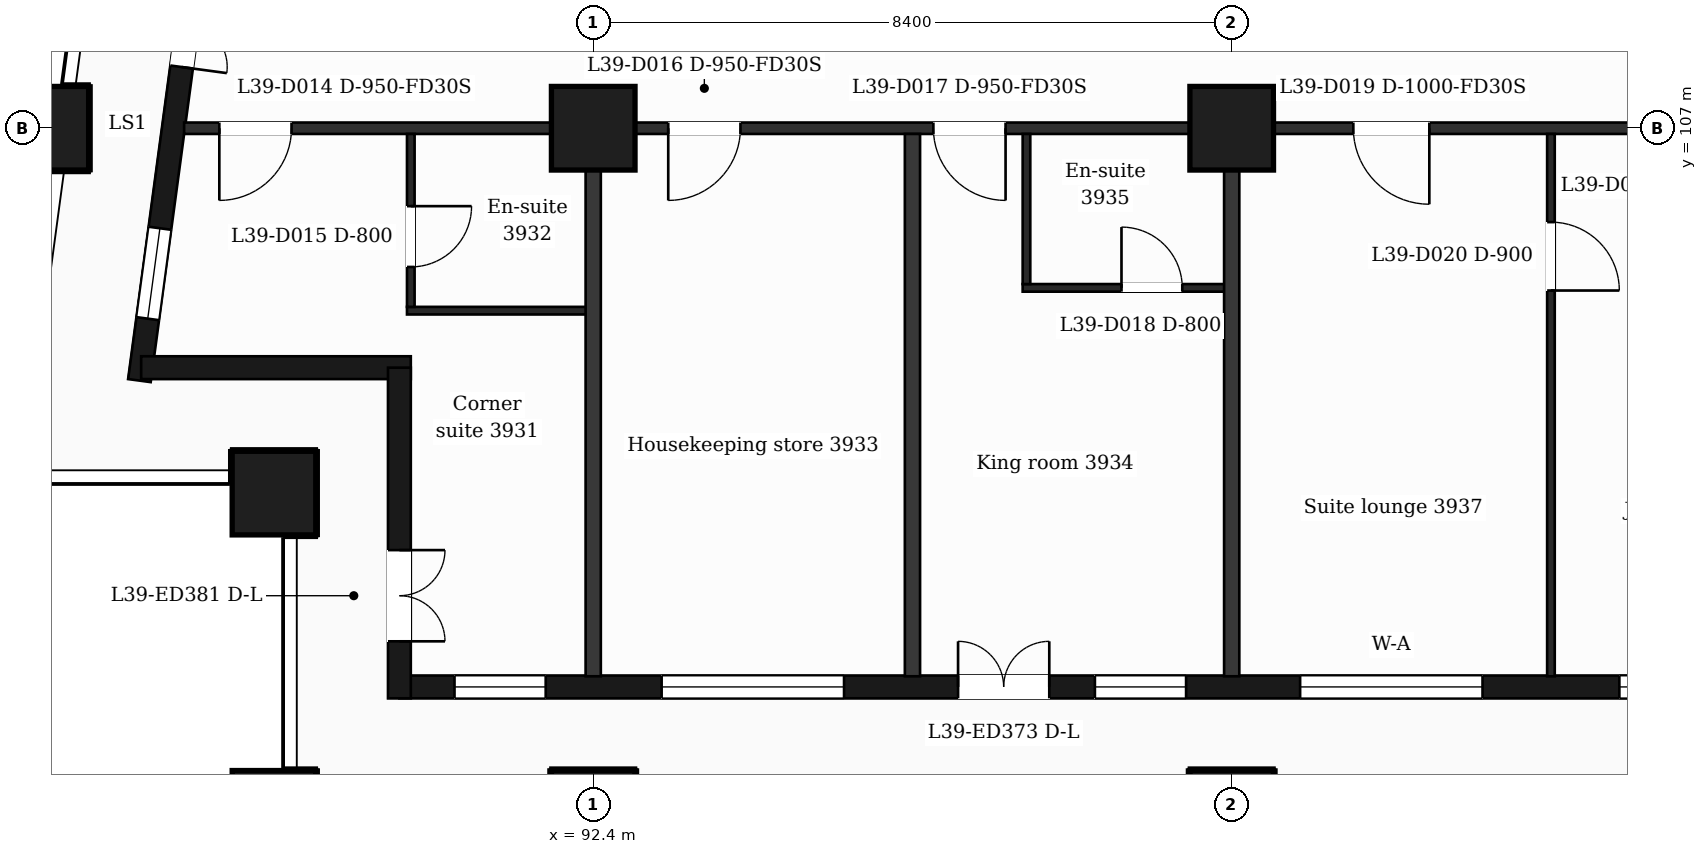
"""IFC4 building model, lengths in metres.
Left out: names, types, materials, properties, quantities, classifications, styles, units other than length and angle.
Written with IfcOpenShell. Run it as: python <this file> out.ifc"""

import sys

from ifc_helpers import new_model, si_unit, direction, frame, frame_2d, origin, origin_2d, place, context, subcontext, project, spatial, rectangle, extrude, element, fill, save


model = new_model("IFC4")
c1 = context("Model", 3, precision=1e-05, world=origin(), true_north=direction((0.0, 1.0)))
c2 = subcontext(c1, "Body", "Model", "MODEL_VIEW")
j1 = project(units=[si_unit("LENGTHUNIT", "METRE"), si_unit("PLANEANGLEUNIT", "RADIAN")], contexts=[c1])
p1 = place(None, origin())
s1 = spatial("IfcSite", under=j1, at=p1, CompositionType="ELEMENT")
p2 = place(p1, origin())
s2 = spatial("IfcBuilding", under=s1, at=p2, CompositionType="ELEMENT")
p3 = place(p2, frame((0.0, 0.0, 166.3)))
s3 = spatial("IfcBuildingStorey", under=s2, at=p3, CompositionType="ELEMENT", Elevation=166.3)
for number, where, z_axis, x_axis in (
    (1, (92.4, 98.0, 0.0), (0.0, 0.0, 1.0), (1.0, 0.0, 0.0)),
    (2, (100.8, 98.0, 0.0), (0.0, 0.0, 1.0), (1.0, 0.0, 0.0)),
    (3, (88.2, 98.0, 0.0), (0.0, 0.0, 1.0), (1.0, 0.0, 0.0)),
    (4, (88.2, 102.2, 0.0), (0.0, 0.0, 1.0), (1.0, 0.0, 0.0)),
    (5, (92.4, 107.0, 0.0), (0.0, 0.0, 1.0), (1.0, 0.0, 0.0)),
    (6, (100.8, 107.0, 0.0), (0.0, 0.0, 1.0), (1.0, 0.0, 0.0)),
    (7, (85.211, 107.0, 0.0), (0.0, 0.0, 1.0), (1.0, 0.0, 0.0)),
):
    element("IfcColumn", number, at=place(p3, frame(where, z_axis=z_axis, x_axis=x_axis)), inside=s3, PredefinedType="COLUMN", context=c2, shape_type="SweptSolid", body=[
        extrude(rectangle(XDim=1.1, YDim=1.1, at=origin_2d()), origin(), (0.0, 0.0, 1.0), 3.7),
    ])
p4 = place(p3, frame((89.85, 99.65, 0.0), z_axis=(0.0, 0.0, 1.0), x_axis=(1.0, 0.0, 0.0)))
e8 = element("IfcWall", 8, at=p4, inside=s3, PredefinedType="SOLIDWALL", context=c2, shape_type="SweptSolid", body=[
    extrude(rectangle(XDim=47.25, YDim=0.3, at=frame_2d((23.625, 0.0))), origin(), (0.0, 0.0, 1.0), 3.38),
])
p5 = place(p4, frame((0.725, 0.0, 0.9)))
e9 = element("IfcOpeningElement", 9, at=p5, cuts=e8, PredefinedType="OPENING", context=c2, shape_type="SweptSolid", body=[
    extrude(rectangle(XDim=1.2, YDim=2.1, at=frame_2d((0.6, 1.05))), frame((0.0, 0.16, 0.0), z_axis=(0.0, -1.0, 0.0), x_axis=(1.0, 0.0, 0.0)), (0.0, 0.0, 1.0), 0.32),
])
p6 = place(p4, frame((3.45, 0.0, 0.9)))
e10 = element("IfcOpeningElement", 10, at=p6, cuts=e8, PredefinedType="OPENING", context=c2, shape_type="SweptSolid", body=[
    extrude(rectangle(XDim=2.4, YDim=2.1, at=frame_2d((1.2, 1.05))), frame((0.0, 0.16, 0.0), z_axis=(0.0, -1.0, 0.0), x_axis=(1.0, 0.0, 0.0)), (0.0, 0.0, 1.0), 0.32),
])
p7 = place(p4, frame((7.35, 0.0, 0.0)))
e11 = element("IfcOpeningElement", 11, at=p7, cuts=e8, PredefinedType="OPENING", context=c2, shape_type="SweptSolid", body=[
    extrude(rectangle(XDim=1.2, YDim=2.4, at=frame_2d((0.6, 1.2))), frame((0.0, 0.16, 0.0), z_axis=(0.0, -1.0, 0.0), x_axis=(1.0, 0.0, 0.0)), (0.0, 0.0, 1.0), 0.32),
])
p8 = place(p4, frame((9.15, 0.0, 0.9)))
e12 = element("IfcOpeningElement", 12, at=p8, cuts=e8, PredefinedType="OPENING", context=c2, shape_type="SweptSolid", body=[
    extrude(rectangle(XDim=1.2, YDim=2.1, at=frame_2d((0.6, 1.05))), frame((0.0, 0.16, 0.0), z_axis=(0.0, -1.0, 0.0), x_axis=(1.0, 0.0, 0.0)), (0.0, 0.0, 1.0), 0.32),
])
p9 = place(p4, frame((11.85, 0.0, 0.9)))
e13 = element("IfcOpeningElement", 13, at=p9, cuts=e8, PredefinedType="OPENING", context=c2, shape_type="SweptSolid", body=[
    extrude(rectangle(XDim=2.4, YDim=2.1, at=frame_2d((1.2, 1.05))), frame((0.0, 0.16, 0.0), z_axis=(0.0, -1.0, 0.0), x_axis=(1.0, 0.0, 0.0)), (0.0, 0.0, 1.0), 0.32),
])
p10 = place(p4, frame((16.05, 0.0, 0.9)))
e14 = element("IfcOpeningElement", 14, at=p10, cuts=e8, PredefinedType="OPENING", context=c2, shape_type="SweptSolid", body=[
    extrude(rectangle(XDim=2.4, YDim=2.1, at=frame_2d((1.2, 1.05))), frame((0.0, 0.16, 0.0), z_axis=(0.0, -1.0, 0.0), x_axis=(1.0, 0.0, 0.0)), (0.0, 0.0, 1.0), 0.32),
])
p11 = place(p4, frame((20.85, 0.0, 0.9)))
e15 = element("IfcOpeningElement", 15, at=p11, cuts=e8, PredefinedType="OPENING", context=c2, shape_type="SweptSolid", body=[
    extrude(rectangle(XDim=1.2, YDim=2.1, at=frame_2d((0.6, 1.05))), frame((0.0, 0.16, 0.0), z_axis=(0.0, -1.0, 0.0), x_axis=(1.0, 0.0, 0.0)), (0.0, 0.0, 1.0), 0.32),
])
p12 = place(p4, frame((25.05, 0.0, 0.9)))
e16 = element("IfcOpeningElement", 16, at=p12, cuts=e8, PredefinedType="OPENING", context=c2, shape_type="SweptSolid", body=[
    extrude(rectangle(XDim=1.2, YDim=2.1, at=frame_2d((0.6, 1.05))), frame((0.0, 0.16, 0.0), z_axis=(0.0, -1.0, 0.0), x_axis=(1.0, 0.0, 0.0)), (0.0, 0.0, 1.0), 0.32),
])
p13 = place(p4, frame((28.65, 0.0, 0.9)))
e17 = element("IfcOpeningElement", 17, at=p13, cuts=e8, PredefinedType="OPENING", context=c2, shape_type="SweptSolid", body=[
    extrude(rectangle(XDim=2.4, YDim=2.1, at=frame_2d((1.2, 1.05))), frame((0.0, 0.16, 0.0), z_axis=(0.0, -1.0, 0.0), x_axis=(1.0, 0.0, 0.0)), (0.0, 0.0, 1.0), 0.32),
])
p14 = place(p4, frame((32.85, 0.0, 0.9)))
e18 = element("IfcOpeningElement", 18, at=p14, cuts=e8, PredefinedType="OPENING", context=c2, shape_type="SweptSolid", body=[
    extrude(rectangle(XDim=2.4, YDim=2.1, at=frame_2d((1.2, 1.05))), frame((0.0, 0.16, 0.0), z_axis=(0.0, -1.0, 0.0), x_axis=(1.0, 0.0, 0.0)), (0.0, 0.0, 1.0), 0.32),
])
p15 = place(p4, frame((37.05, 0.0, 0.9)))
e19 = element("IfcOpeningElement", 19, at=p15, cuts=e8, PredefinedType="OPENING", context=c2, shape_type="SweptSolid", body=[
    extrude(rectangle(XDim=2.4, YDim=2.1, at=frame_2d((1.2, 1.05))), frame((0.0, 0.16, 0.0), z_axis=(0.0, -1.0, 0.0), x_axis=(1.0, 0.0, 0.0)), (0.0, 0.0, 1.0), 0.32),
])
p16 = place(p4, frame((41.25, 0.0, 0.9)))
e20 = element("IfcOpeningElement", 20, at=p16, cuts=e8, PredefinedType="OPENING", context=c2, shape_type="SweptSolid", body=[
    extrude(rectangle(XDim=2.4, YDim=2.1, at=frame_2d((1.2, 1.05))), frame((0.0, 0.16, 0.0), z_axis=(0.0, -1.0, 0.0), x_axis=(1.0, 0.0, 0.0)), (0.0, 0.0, 1.0), 0.32),
])
p17 = place(p4, frame((45.25, 0.0, 0.9)))
e21 = element("IfcOpeningElement", 21, at=p17, cuts=e8, PredefinedType="OPENING", context=c2, shape_type="SweptSolid", body=[
    extrude(rectangle(XDim=1.2, YDim=2.1, at=frame_2d((0.6, 1.05))), frame((0.0, 0.16, 0.0), z_axis=(0.0, -1.0, 0.0), x_axis=(1.0, 0.0, 0.0)), (0.0, 0.0, 1.0), 0.32),
])
p18 = place(p3, frame((87.334, 110.4, 0.0), z_axis=(0.0, 0.0, 1.0), x_axis=(-0.133437175554, -0.991057273915, 0.0)))
e22 = element("IfcWall", 22, at=p18, inside=s3, PredefinedType="SOLIDWALL", context=c2, shape_type="SweptSolid", body=[
    extrude(rectangle(XDim=6.781, YDim=0.3, at=frame_2d((3.39, 0.0))), origin(), (0.0, 0.0, 1.0), 3.38),
])
p19 = place(p18, frame((1.418, 0.0, 0.0)))
e23 = element("IfcOpeningElement", 23, at=p19, cuts=e22, PredefinedType="OPENING", context=c2, shape_type="SweptSolid", body=[
    extrude(rectangle(XDim=1.2, YDim=2.4, at=frame_2d((0.6, 1.2))), frame((0.0, 0.16, 0.0), z_axis=(0.0, -1.0, 0.0), x_axis=(1.0, 0.0, 0.0)), (0.0, 0.0, 1.0), 0.32),
])
p20 = place(p18, frame((4.758, 0.0, 0.9)))
e24 = element("IfcOpeningElement", 24, at=p20, cuts=e22, PredefinedType="OPENING", context=c2, shape_type="SweptSolid", body=[
    extrude(rectangle(XDim=1.2, YDim=2.1, at=frame_2d((0.6, 1.05))), frame((0.0, 0.16, 0.0), z_axis=(0.0, -1.0, 0.0), x_axis=(1.0, 0.0, 0.0)), (0.0, 0.0, 1.0), 0.32),
])
p21 = place(p3, frame((86.452, 103.85, 0.0), z_axis=(0.0, 0.0, 1.0), x_axis=(1.0, 0.0, 0.0)))
e25 = element("IfcWall", 25, at=p21, inside=s3, PredefinedType="SOLIDWALL", context=c2, shape_type="SweptSolid", body=[
    extrude(rectangle(XDim=3.548, YDim=0.3, at=frame_2d((1.774, 0.0))), origin(), (0.0, 0.0, 1.0), 3.38),
])
p22 = place(p3, frame((89.85, 103.85, 0.0), z_axis=(0.0, 0.0, 1.0), x_axis=(0.0, -1.0, 0.0)))
e26 = element("IfcWall", 26, at=p22, inside=s3, PredefinedType="SOLIDWALL", context=c2, shape_type="SweptSolid", body=[
    extrude(rectangle(XDim=4.35, YDim=0.3, at=frame_2d((2.175, 0.0))), origin(), (0.0, 0.0, 1.0), 3.38),
])
p23 = place(p22, frame((2.4, 0.0, 0.0)))
e27 = element("IfcOpeningElement", 27, at=p23, cuts=e26, PredefinedType="OPENING", context=c2, shape_type="SweptSolid", body=[
    extrude(rectangle(XDim=1.2, YDim=2.4, at=frame_2d((0.6, 1.2))), frame((0.0, 0.16, 0.0), z_axis=(0.0, -1.0, 0.0), x_axis=(1.0, 0.0, 0.0)), (0.0, 0.0, 1.0), 0.32),
])
p24 = place(p3, frame((89.95, 104.6, 0.0), z_axis=(0.0, 0.0, 1.0), x_axis=(1.0, 0.0, 0.0)))
e28 = element("IfcWall", 28, at=p24, inside=s3, PredefinedType="PARTITIONING", context=c2, shape_type="SweptSolid", body=[
    extrude(rectangle(XDim=2.45, YDim=0.1, at=frame_2d((1.225, 0.0))), origin(), (0.0, 0.0, 1.0), 3.38),
])
p25 = place(p3, frame((98.05, 104.9, 0.0), z_axis=(0.0, 0.0, 1.0), x_axis=(1.0, 0.0, 0.0)))
e29 = element("IfcWall", 29, at=p25, inside=s3, PredefinedType="PARTITIONING", context=c2, shape_type="SweptSolid", body=[
    extrude(rectangle(XDim=2.75, YDim=0.1, at=frame_2d((1.375, 0.0))), origin(), (0.0, 0.0, 1.0), 3.38),
])
p26 = place(p25, frame((1.3, 0.0, 0.0)))
e30 = element("IfcOpeningElement", 30, at=p26, cuts=e29, PredefinedType="OPENING", context=c2, shape_type="SweptSolid", body=[
    extrude(rectangle(XDim=0.8, YDim=2.1, at=frame_2d((0.4, 1.05))), frame((0.0, 0.06, 0.0), z_axis=(0.0, -1.0, 0.0), x_axis=(1.0, 0.0, 0.0)), (0.0, 0.0, 1.0), 0.12),
])
p27 = place(p3, frame((87.018, 107.0, 0.0), z_axis=(0.0, 0.0, 1.0), x_axis=(1.0, 0.0, 0.0)))
e31 = element("IfcWall", 31, at=p27, inside=s3, PredefinedType="PARTITIONING", context=c2, shape_type="SweptSolid", body=[
    extrude(rectangle(XDim=52.765, YDim=0.15, at=frame_2d((26.382, 0.0))), origin(), (0.0, 0.0, 1.0), 3.38),
])
p28 = place(p27, frame((0.463, 0.0, 0.0)))
e32 = element("IfcOpeningElement", 32, at=p28, cuts=e31, PredefinedType="OPENING", context=c2, shape_type="SweptSolid", body=[
    extrude(rectangle(XDim=0.95, YDim=2.1, at=frame_2d((0.475, 1.05))), frame((0.0, 0.085, 0.0), z_axis=(0.0, -1.0, 0.0), x_axis=(1.0, 0.0, 0.0)), (0.0, 0.0, 1.0), 0.17),
])
p29 = place(p27, frame((6.369, 0.0, 0.0)))
e33 = element("IfcOpeningElement", 33, at=p29, cuts=e31, PredefinedType="OPENING", context=c2, shape_type="SweptSolid", body=[
    extrude(rectangle(XDim=0.95, YDim=2.1, at=frame_2d((0.475, 1.05))), frame((0.0, 0.085, 0.0), z_axis=(0.0, -1.0, 0.0), x_axis=(1.0, 0.0, 0.0)), (0.0, 0.0, 1.0), 0.17),
])
p30 = place(p27, frame((9.857, 0.0, 0.0)))
e34 = element("IfcOpeningElement", 34, at=p30, cuts=e31, PredefinedType="OPENING", context=c2, shape_type="SweptSolid", body=[
    extrude(rectangle(XDim=0.95, YDim=2.1, at=frame_2d((0.475, 1.05))), frame((0.0, 0.085, 0.0), z_axis=(0.0, -1.0, 0.0), x_axis=(1.0, 0.0, 0.0)), (0.0, 0.0, 1.0), 0.17),
])
p31 = place(p27, frame((15.382, 0.0, 0.0)))
e35 = element("IfcOpeningElement", 35, at=p31, cuts=e31, PredefinedType="OPENING", context=c2, shape_type="SweptSolid", body=[
    extrude(rectangle(XDim=1.0, YDim=2.1, at=frame_2d((0.5, 1.05))), frame((0.0, 0.085, 0.0), z_axis=(0.0, -1.0, 0.0), x_axis=(1.0, 0.0, 0.0)), (0.0, 0.0, 1.0), 0.17),
])
p32 = place(p27, frame((24.932, 0.0, 0.0)))
e36 = element("IfcOpeningElement", 36, at=p32, cuts=e31, PredefinedType="OPENING", context=c2, shape_type="SweptSolid", body=[
    extrude(rectangle(XDim=1.0, YDim=2.1, at=frame_2d((0.5, 1.05))), frame((0.0, 0.085, 0.0), z_axis=(0.0, -1.0, 0.0), x_axis=(1.0, 0.0, 0.0)), (0.0, 0.0, 1.0), 0.17),
])
p33 = place(p27, frame((27.819, 0.0, 0.0)))
e37 = element("IfcOpeningElement", 37, at=p33, cuts=e31, PredefinedType="OPENING", context=c2, shape_type="SweptSolid", body=[
    extrude(rectangle(XDim=0.95, YDim=2.1, at=frame_2d((0.475, 1.05))), frame((0.0, 0.085, 0.0), z_axis=(0.0, -1.0, 0.0), x_axis=(1.0, 0.0, 0.0)), (0.0, 0.0, 1.0), 0.17),
])
p34 = place(p27, frame((42.012, 0.0, 0.0)))
e38 = element("IfcOpeningElement", 38, at=p34, cuts=e31, PredefinedType="OPENING", context=c2, shape_type="SweptSolid", body=[
    extrude(rectangle(XDim=1.0, YDim=2.1, at=frame_2d((0.5, 1.05))), frame((0.0, 0.085, 0.0), z_axis=(0.0, -1.0, 0.0), x_axis=(1.0, 0.0, 0.0)), (0.0, 0.0, 1.0), 0.17),
])
p35 = place(p27, frame((48.249, 0.0, 0.0)))
e39 = element("IfcOpeningElement", 39, at=p35, cuts=e31, PredefinedType="OPENING", context=c2, shape_type="SweptSolid", body=[
    extrude(rectangle(XDim=0.95, YDim=2.1, at=frame_2d((0.475, 1.05))), frame((0.0, 0.085, 0.0), z_axis=(0.0, -1.0, 0.0), x_axis=(1.0, 0.0, 0.0)), (0.0, 0.0, 1.0), 0.17),
])
p36 = place(p3, frame((90.0, 104.65, 0.0), z_axis=(0.0, 0.0, 1.0), x_axis=(0.0, 1.0, 0.0)))
e40 = element("IfcWall", 40, at=p36, inside=s3, PredefinedType="PARTITIONING", context=c2, shape_type="SweptSolid", body=[
    extrude(rectangle(XDim=2.275, YDim=0.1, at=frame_2d((1.138, 0.0))), origin(), (0.0, 0.0, 1.0), 3.38),
])
p37 = place(p36, frame((0.525, 0.0, 0.0)))
e41 = element("IfcOpeningElement", 41, at=p37, cuts=e40, PredefinedType="OPENING", context=c2, shape_type="SweptSolid", body=[
    extrude(rectangle(XDim=0.8, YDim=2.1, at=frame_2d((0.4, 1.05))), frame((0.0, 0.06, 0.0), z_axis=(0.0, -1.0, 0.0), x_axis=(1.0, 0.0, 0.0)), (0.0, 0.0, 1.0), 0.12),
])
for number, where, z_axis, x_axis in (
    (42, (92.4, 99.79, 0.0), (0.0, 0.0, 1.0), (0.0, 1.0, 0.0)),
    (43, (96.6, 99.79, 0.0), (0.0, 0.0, 1.0), (0.0, 1.0, 0.0)),
):
    element("IfcWall", number, at=place(p3, frame(where, z_axis=z_axis, x_axis=x_axis)), inside=s3, PredefinedType="PARTITIONING", context=c2, shape_type="SweptSolid", body=[
        extrude(rectangle(XDim=7.135, YDim=0.2, at=frame_2d((3.567, 0.0))), origin(), (0.0, 0.0, 1.0), 3.38),
    ])
p38 = place(p3, frame((98.1, 104.95, 0.0), z_axis=(0.0, 0.0, 1.0), x_axis=(0.0, 1.0, 0.0)))
e44 = element("IfcWall", 44, at=p38, inside=s3, PredefinedType="PARTITIONING", context=c2, shape_type="SweptSolid", body=[
    extrude(rectangle(XDim=1.975, YDim=0.1, at=frame_2d((0.988, 0.0))), origin(), (0.0, 0.0, 1.0), 3.38),
])
p39 = place(p3, frame((100.8, 99.79, 0.0), z_axis=(0.0, 0.0, 1.0), x_axis=(0.0, 1.0, 0.0)))
e45 = element("IfcWall", 45, at=p39, inside=s3, PredefinedType="PARTITIONING", context=c2, shape_type="SweptSolid", body=[
    extrude(rectangle(XDim=7.135, YDim=0.2, at=frame_2d((3.567, 0.0))), origin(), (0.0, 0.0, 1.0), 3.38),
])
p40 = place(p3, frame((105.0, 99.79, 0.0), z_axis=(0.0, 0.0, 1.0), x_axis=(0.0, 1.0, 0.0)))
e46 = element("IfcWall", 46, at=p40, inside=s3, PredefinedType="PARTITIONING", context=c2, shape_type="SweptSolid", body=[
    extrude(rectangle(XDim=7.135, YDim=0.1, at=frame_2d((3.567, 0.0))), origin(), (0.0, 0.0, 1.0), 3.38),
])
p41 = place(p40, frame((5.075, 0.0, 0.0)))
e47 = element("IfcOpeningElement", 47, at=p41, cuts=e46, PredefinedType="OPENING", context=c2, shape_type="SweptSolid", body=[
    extrude(rectangle(XDim=0.9, YDim=2.1, at=frame_2d((0.45, 1.05))), frame((0.0, 0.06, 0.0), z_axis=(0.0, -1.0, 0.0), x_axis=(1.0, 0.0, 0.0)), (0.0, 0.0, 1.0), 0.12),
])
p42 = place(p5, origin())
e48 = element("IfcWindow", 48, at=p42, inside=s3, PartitioningType="SINGLE_PANEL", PredefinedType="WINDOW", context=c2, shape_type="SweptSolid", body=[
    extrude(rectangle(XDim=1.2, YDim=2.1, at=frame_2d((0.6, 1.05))), frame((0.0, 0.03, 0.0), z_axis=(0.0, -1.0, 0.0), x_axis=(1.0, 0.0, 0.0)), (0.0, 0.0, 1.0), 0.06),
])
fill(e9, e48)
p43 = place(p6, origin())
e49 = element("IfcWindow", 49, at=p43, inside=s3, PartitioningType="SINGLE_PANEL", PredefinedType="WINDOW", context=c2, shape_type="SweptSolid", body=[
    extrude(rectangle(XDim=2.4, YDim=2.1, at=frame_2d((1.2, 1.05))), frame((0.0, 0.03, 0.0), z_axis=(0.0, -1.0, 0.0), x_axis=(1.0, 0.0, 0.0)), (0.0, 0.0, 1.0), 0.06),
])
fill(e10, e49)
p44 = place(p7, origin())
e50 = element("IfcDoor", 50, at=p44, inside=s3, OperationType="DOUBLE_DOOR_SINGLE_SWING", PredefinedType="DOOR", context=c2, shape_type="SweptSolid", body=[
    extrude(rectangle(XDim=1.2, YDim=2.4, at=frame_2d((0.6, 1.2))), frame((0.0, 0.025, 0.0), z_axis=(0.0, -1.0, 0.0), x_axis=(1.0, 0.0, 0.0)), (0.0, 0.0, 1.0), 0.05),
])
fill(e11, e50)
p45 = place(p8, origin())
e51 = element("IfcWindow", 51, at=p45, inside=s3, PartitioningType="SINGLE_PANEL", PredefinedType="WINDOW", context=c2, shape_type="SweptSolid", body=[
    extrude(rectangle(XDim=1.2, YDim=2.1, at=frame_2d((0.6, 1.05))), frame((0.0, 0.03, 0.0), z_axis=(0.0, -1.0, 0.0), x_axis=(1.0, 0.0, 0.0)), (0.0, 0.0, 1.0), 0.06),
])
fill(e12, e51)
p46 = place(p9, origin())
e52 = element("IfcWindow", 52, at=p46, inside=s3, PartitioningType="SINGLE_PANEL", PredefinedType="WINDOW", context=c2, shape_type="SweptSolid", body=[
    extrude(rectangle(XDim=2.4, YDim=2.1, at=frame_2d((1.2, 1.05))), frame((0.0, 0.03, 0.0), z_axis=(0.0, -1.0, 0.0), x_axis=(1.0, 0.0, 0.0)), (0.0, 0.0, 1.0), 0.06),
])
fill(e13, e52)
p47 = place(p10, origin())
e53 = element("IfcWindow", 53, at=p47, inside=s3, PartitioningType="SINGLE_PANEL", PredefinedType="WINDOW", context=c2, shape_type="SweptSolid", body=[
    extrude(rectangle(XDim=2.4, YDim=2.1, at=frame_2d((1.2, 1.05))), frame((0.0, 0.03, 0.0), z_axis=(0.0, -1.0, 0.0), x_axis=(1.0, 0.0, 0.0)), (0.0, 0.0, 1.0), 0.06),
])
fill(e14, e53)
p48 = place(p19, origin())
e54 = element("IfcDoor", 54, at=p48, inside=s3, OperationType="DOUBLE_DOOR_SINGLE_SWING", PredefinedType="DOOR", context=c2, shape_type="SweptSolid", body=[
    extrude(rectangle(XDim=1.2, YDim=2.4, at=frame_2d((0.6, 1.2))), frame((0.0, 0.025, 0.0), z_axis=(0.0, -1.0, 0.0), x_axis=(1.0, 0.0, 0.0)), (0.0, 0.0, 1.0), 0.05),
])
fill(e23, e54)
p49 = place(p20, origin())
e55 = element("IfcWindow", 55, at=p49, inside=s3, PartitioningType="SINGLE_PANEL", PredefinedType="WINDOW", context=c2, shape_type="SweptSolid", body=[
    extrude(rectangle(XDim=1.2, YDim=2.1, at=frame_2d((0.6, 1.05))), frame((0.0, 0.03, 0.0), z_axis=(0.0, -1.0, 0.0), x_axis=(1.0, 0.0, 0.0)), (0.0, 0.0, 1.0), 0.06),
])
fill(e24, e55)
p50 = place(p23, origin())
e56 = element("IfcDoor", 56, at=p50, inside=s3, OperationType="DOUBLE_DOOR_SINGLE_SWING", PredefinedType="DOOR", context=c2, shape_type="SweptSolid", body=[
    extrude(rectangle(XDim=1.2, YDim=2.4, at=frame_2d((0.6, 1.2))), frame((0.0, 0.025, 0.0), z_axis=(0.0, -1.0, 0.0), x_axis=(1.0, 0.0, 0.0)), (0.0, 0.0, 1.0), 0.05),
])
fill(e27, e56)
p51 = place(p28, origin())
e57 = element("IfcDoor", 57, at=p51, inside=s3, OperationType="SINGLE_SWING_LEFT", PredefinedType="DOOR", context=c2, shape_type="SweptSolid", body=[
    extrude(rectangle(XDim=0.95, YDim=2.1, at=frame_2d((0.475, 1.05))), frame((0.0, 0.025, 0.0), z_axis=(0.0, -1.0, 0.0), x_axis=(1.0, 0.0, 0.0)), (0.0, 0.0, 1.0), 0.05),
])
fill(e32, e57)
p52 = place(p37, origin())
e58 = element("IfcDoor", 58, at=p52, inside=s3, OperationType="SINGLE_SWING_RIGHT", PredefinedType="DOOR", context=c2, shape_type="SweptSolid", body=[
    extrude(rectangle(XDim=0.8, YDim=2.1, at=frame_2d((0.4, 1.05))), frame((0.0, 0.025, 0.0), z_axis=(0.0, -1.0, 0.0), x_axis=(1.0, 0.0, 0.0)), (0.0, 0.0, 1.0), 0.05),
])
fill(e41, e58)
p53 = place(p29, origin())
e59 = element("IfcDoor", 59, at=p53, inside=s3, OperationType="SINGLE_SWING_LEFT", PredefinedType="DOOR", context=c2, shape_type="SweptSolid", body=[
    extrude(rectangle(XDim=0.95, YDim=2.1, at=frame_2d((0.475, 1.05))), frame((0.0, 0.025, 0.0), z_axis=(0.0, -1.0, 0.0), x_axis=(1.0, 0.0, 0.0)), (0.0, 0.0, 1.0), 0.05),
])
fill(e33, e59)
p54 = place(p30, origin())
e60 = element("IfcDoor", 60, at=p54, inside=s3, OperationType="SINGLE_SWING_RIGHT", PredefinedType="DOOR", context=c2, shape_type="SweptSolid", body=[
    extrude(rectangle(XDim=0.95, YDim=2.1, at=frame_2d((0.475, 1.05))), frame((0.0, 0.025, 0.0), z_axis=(0.0, -1.0, 0.0), x_axis=(1.0, 0.0, 0.0)), (0.0, 0.0, 1.0), 0.05),
])
fill(e34, e60)
p55 = place(p26, origin())
e61 = element("IfcDoor", 61, at=p55, inside=s3, OperationType="SINGLE_SWING_LEFT", PredefinedType="DOOR", context=c2, shape_type="SweptSolid", body=[
    extrude(rectangle(XDim=0.8, YDim=2.1, at=frame_2d((0.4, 1.05))), frame((0.0, 0.025, 0.0), z_axis=(0.0, -1.0, 0.0), x_axis=(1.0, 0.0, 0.0)), (0.0, 0.0, 1.0), 0.05),
])
fill(e30, e61)
p56 = place(p31, origin())
e62 = element("IfcDoor", 62, at=p56, inside=s3, OperationType="SINGLE_SWING_RIGHT", PredefinedType="DOOR", context=c2, shape_type="SweptSolid", body=[
    extrude(rectangle(XDim=1.0, YDim=2.1, at=frame_2d((0.5, 1.05))), frame((0.0, 0.025, 0.0), z_axis=(0.0, -1.0, 0.0), x_axis=(1.0, 0.0, 0.0)), (0.0, 0.0, 1.0), 0.05),
])
fill(e35, e62)
p57 = place(p41, origin())
e63 = element("IfcDoor", 63, at=p57, inside=s3, OperationType="SINGLE_SWING_LEFT", PredefinedType="DOOR", context=c2, shape_type="SweptSolid", body=[
    extrude(rectangle(XDim=0.9, YDim=2.1, at=frame_2d((0.45, 1.05))), frame((0.0, 0.025, 0.0), z_axis=(0.0, -1.0, 0.0), x_axis=(1.0, 0.0, 0.0)), (0.0, 0.0, 1.0), 0.05),
])
fill(e47, e63)
save(model, sys.argv[1])
